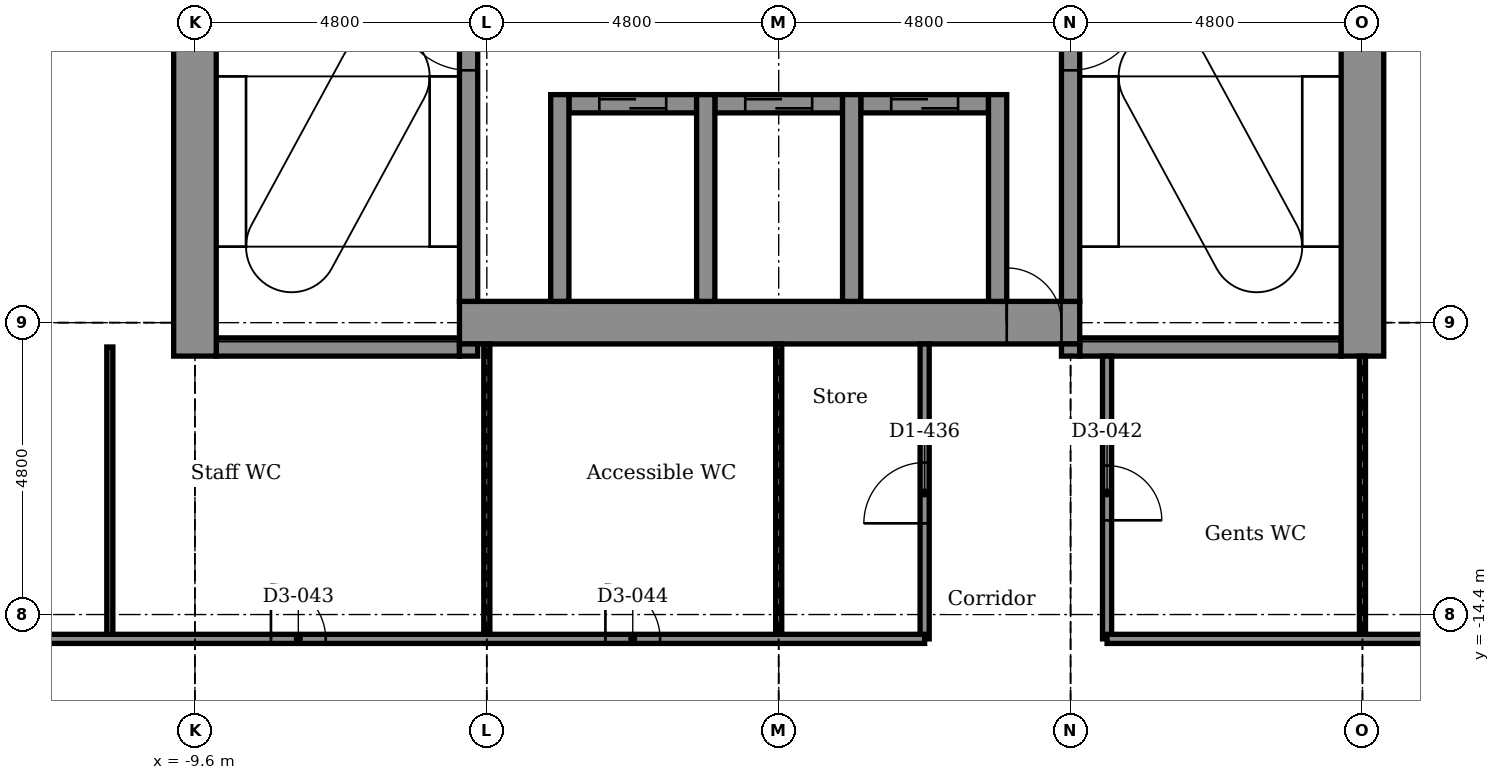
"""IFC4 building model, lengths in metres.
Left out: names, types, materials, properties, quantities, classifications, styles, units other than length and angle.
Written with IfcOpenShell. Run it as: python <this file> out.ifc"""

import sys

from ifc_helpers import new_model, si_unit, direction, frame, frame_2d, origin, place, context, subcontext, project, spatial, rectangle, extrude, element, fill, save


model = new_model("IFC4")
c1 = context("Model", 3, precision=1e-05, world=origin(), true_north=direction((0.0, 1.0)))
c2 = subcontext(c1, "Body", "Model", "MODEL_VIEW")
j1 = project(units=[si_unit("LENGTHUNIT", "METRE"), si_unit("PLANEANGLEUNIT", "RADIAN")], contexts=[c1])
p1 = place(None, origin())
s1 = spatial("IfcSite", under=j1, at=p1, CompositionType="ELEMENT")
p2 = place(p1, origin())
s2 = spatial("IfcBuilding", under=s1, at=p2, CompositionType="ELEMENT")
p3 = place(p2, frame((0.0, 0.0, 150.5)))
s3 = spatial("IfcBuildingStorey", under=s2, at=p3, CompositionType="ELEMENT", Elevation=150.5)
p4 = place(p3, frame((-9.25, -10.0, -0.15), z_axis=(0.0, 0.0, 1.0), x_axis=(1.0, 0.0, 0.0)))
e1 = element("IfcWall", 1, at=p4, inside=s3, PredefinedType="STANDARD", context=c2, shape_type="SweptSolid", body=[
    extrude(rectangle(XDim=4.0, YDim=0.3, at=frame_2d((2.0, 0.0))), origin(), (0.0, 0.0, 1.0), 3.9),
])
p5 = place(p3, frame((4.95, -10.0, -0.15), z_axis=(0.0, 0.0, 1.0), x_axis=(1.0, 0.0, 0.0)))
e2 = element("IfcWall", 2, at=p5, inside=s3, PredefinedType="STANDARD", context=c2, shape_type="SweptSolid", body=[
    extrude(rectangle(XDim=4.3, YDim=0.3, at=frame_2d((2.15, 0.0))), origin(), (0.0, 0.0, 1.0), 3.9),
])
p6 = place(p3, frame((-5.25, -9.6, -0.15), z_axis=(0.0, 0.0, 1.0), x_axis=(1.0, 0.0, 0.0)))
e3 = element("IfcWall", 3, at=p6, inside=s3, PredefinedType="SHEAR", context=c2, shape_type="SweptSolid", body=[
    extrude(rectangle(XDim=10.2, YDim=0.7, at=frame_2d((5.1, 0.0))), origin(), (0.0, 0.0, 1.0), 3.9),
])
p7 = place(p6, frame((9.0, 0.0, 0.15)))
e4 = element("IfcOpeningElement", 4, at=p7, cuts=e3, PredefinedType="OPENING", context=c2, shape_type="SweptSolid", body=[
    extrude(rectangle(XDim=0.9, YDim=2.1, at=frame_2d((0.45, 1.05))), frame((0.0, 0.36, 0.0), z_axis=(0.0, -1.0, 0.0), x_axis=(1.0, 0.0, 0.0)), (0.0, 0.0, 1.0), 0.72),
])
p8 = place(p3, frame((-3.45, -6.0, -0.15), z_axis=(0.0, 0.0, 1.0), x_axis=(1.0, 0.0, 0.0)))
e5 = element("IfcWall", 5, at=p8, inside=s3, PredefinedType="STANDARD", context=c2, shape_type="SweptSolid", body=[
    extrude(rectangle(XDim=2.1, YDim=0.3, at=frame_2d((1.05, 0.0))), origin(), (0.0, 0.0, 1.0), 3.9),
])
p9 = place(p8, frame((0.5, 0.0, 0.15)))
e6 = element("IfcOpeningElement", 6, at=p9, cuts=e5, PredefinedType="OPENING", context=c2, shape_type="SweptSolid", body=[
    extrude(rectangle(XDim=1.1, YDim=2.1, at=frame_2d((0.55, 1.05))), frame((0.0, 0.16, 0.0), z_axis=(0.0, -1.0, 0.0), x_axis=(1.0, 0.0, 0.0)), (0.0, 0.0, 1.0), 0.32),
])
p10 = place(p3, frame((-1.05, -6.0, -0.15), z_axis=(0.0, 0.0, 1.0), x_axis=(1.0, 0.0, 0.0)))
e7 = element("IfcWall", 7, at=p10, inside=s3, PredefinedType="STANDARD", context=c2, shape_type="SweptSolid", body=[
    extrude(rectangle(XDim=2.1, YDim=0.3, at=frame_2d((1.05, 0.0))), origin(), (0.0, 0.0, 1.0), 3.9),
])
p11 = place(p10, frame((0.5, 0.0, 0.15)))
e8 = element("IfcOpeningElement", 8, at=p11, cuts=e7, PredefinedType="OPENING", context=c2, shape_type="SweptSolid", body=[
    extrude(rectangle(XDim=1.1, YDim=2.1, at=frame_2d((0.55, 1.05))), frame((0.0, 0.16, 0.0), z_axis=(0.0, -1.0, 0.0), x_axis=(1.0, 0.0, 0.0)), (0.0, 0.0, 1.0), 0.32),
])
p12 = place(p3, frame((1.35, -6.0, -0.15), z_axis=(0.0, 0.0, 1.0), x_axis=(1.0, 0.0, 0.0)))
e9 = element("IfcWall", 9, at=p12, inside=s3, PredefinedType="STANDARD", context=c2, shape_type="SweptSolid", body=[
    extrude(rectangle(XDim=2.1, YDim=0.3, at=frame_2d((1.05, 0.0))), origin(), (0.0, 0.0, 1.0), 3.9),
])
p13 = place(p12, frame((0.5, 0.0, 0.15)))
e10 = element("IfcOpeningElement", 10, at=p13, cuts=e9, PredefinedType="OPENING", context=c2, shape_type="SweptSolid", body=[
    extrude(rectangle(XDim=1.1, YDim=2.1, at=frame_2d((0.55, 1.05))), frame((0.0, 0.16, 0.0), z_axis=(0.0, -1.0, 0.0), x_axis=(1.0, 0.0, 0.0)), (0.0, 0.0, 1.0), 0.32),
])
p14 = place(p3, frame((-9.6, -10.15, -0.15), z_axis=(0.0, 0.0, 1.0), x_axis=(0.0, 1.0, 0.0)))
e11 = element("IfcWall", 11, at=p14, inside=s3, PredefinedType="SHEAR", context=c2, shape_type="SweptSolid", body=[
    extrude(rectangle(XDim=7.6, YDim=0.7, at=frame_2d((3.8, 0.0))), origin(), (0.0, 0.0, 1.0), 3.9),
])
p15 = place(p3, frame((-5.1, -10.15, -0.15), z_axis=(0.0, 0.0, 1.0), x_axis=(0.0, 1.0, 0.0)))
e12 = element("IfcWall", 12, at=p15, inside=s3, PredefinedType="STANDARD", context=c2, shape_type="SweptSolid", body=[
    extrude(rectangle(XDim=0.2, YDim=0.3, at=frame_2d((0.1, 0.0))), origin(), (0.0, 0.0, 1.0), 3.9),
])
p16 = place(p3, frame((-5.1, -9.25, -0.15), z_axis=(0.0, 0.0, 1.0), x_axis=(0.0, 1.0, 0.0)))
e13 = element("IfcWall", 13, at=p16, inside=s3, PredefinedType="STANDARD", context=c2, shape_type="SweptSolid", body=[
    extrude(rectangle(XDim=7.0, YDim=0.3, at=frame_2d((3.5, 0.0))), origin(), (0.0, 0.0, 1.0), 3.9),
])
p17 = place(p16, frame((3.8, 0.0, 0.15)))
e14 = element("IfcOpeningElement", 14, at=p17, cuts=e13, PredefinedType="OPENING", context=c2, shape_type="SweptSolid", body=[
    extrude(rectangle(XDim=1.2, YDim=2.1, at=frame_2d((0.6, 1.05))), frame((0.0, 0.16, 0.0), z_axis=(0.0, -1.0, 0.0), x_axis=(1.0, 0.0, 0.0)), (0.0, 0.0, 1.0), 0.32),
])
for number, where, z_axis, x_axis in (
    (15, (-3.6, -9.25, -0.15), (0.0, 0.0, 1.0), (0.0, 1.0, 0.0)),
    (16, (-1.2, -9.25, -0.15), (0.0, 0.0, 1.0), (0.0, 1.0, 0.0)),
    (17, (1.2, -9.25, -0.15), (0.0, 0.0, 1.0), (0.0, 1.0, 0.0)),
    (18, (3.6, -9.25, -0.15), (0.0, 0.0, 1.0), (0.0, 1.0, 0.0)),
):
    element("IfcWall", number, at=place(p3, frame(where, z_axis=z_axis, x_axis=x_axis)), inside=s3, PredefinedType="STANDARD", context=c2, shape_type="SweptSolid", body=[
        extrude(rectangle(XDim=3.4, YDim=0.3, at=frame_2d((1.7, 0.0))), origin(), (0.0, 0.0, 1.0), 3.9),
    ])
p18 = place(p3, frame((4.8, -10.15, -0.15), z_axis=(0.0, 0.0, 1.0), x_axis=(0.0, 1.0, 0.0)))
e19 = element("IfcWall", 19, at=p18, inside=s3, PredefinedType="STANDARD", context=c2, shape_type="SweptSolid", body=[
    extrude(rectangle(XDim=0.2, YDim=0.3, at=frame_2d((0.1, 0.0))), origin(), (0.0, 0.0, 1.0), 3.9),
])
p19 = place(p3, frame((4.8, -9.25, -0.15), z_axis=(0.0, 0.0, 1.0), x_axis=(0.0, 1.0, 0.0)))
e20 = element("IfcWall", 20, at=p19, inside=s3, PredefinedType="STANDARD", context=c2, shape_type="SweptSolid", body=[
    extrude(rectangle(XDim=7.0, YDim=0.3, at=frame_2d((3.5, 0.0))), origin(), (0.0, 0.0, 1.0), 3.9),
])
p20 = place(p19, frame((3.8, 0.0, 0.15)))
e21 = element("IfcOpeningElement", 21, at=p20, cuts=e20, PredefinedType="OPENING", context=c2, shape_type="SweptSolid", body=[
    extrude(rectangle(XDim=1.2, YDim=2.1, at=frame_2d((0.6, 1.05))), frame((0.0, 0.16, 0.0), z_axis=(0.0, -1.0, 0.0), x_axis=(1.0, 0.0, 0.0)), (0.0, 0.0, 1.0), 0.32),
])
p21 = place(p3, frame((9.6, -10.15, -0.15), z_axis=(0.0, 0.0, 1.0), x_axis=(0.0, 1.0, 0.0)))
e22 = element("IfcWall", 22, at=p21, inside=s3, PredefinedType="SHEAR", context=c2, shape_type="SweptSolid", body=[
    extrude(rectangle(XDim=20.1, YDim=0.7, at=frame_2d((10.05, 0.0))), origin(), (0.0, 0.0, 1.0), 3.9),
])
p22 = place(p3, frame((9.6, -14.8, 0.0), z_axis=(0.0, 0.0, 1.0), x_axis=(0.0, 1.0, 0.0)))
e23 = element("IfcWall", 23, at=p22, inside=s3, PredefinedType="PARTITIONING", context=c2, shape_type="SweptSolid", body=[
    extrude(rectangle(XDim=4.65, YDim=0.1, at=frame_2d((2.325, 0.0))), origin(), (0.0, 0.0, 1.0), 3.066),
])
p23 = place(p3, frame((5.4, -14.8, 0.0), z_axis=(0.0, 0.0, 1.0), x_axis=(0.0, 1.0, 0.0)))
e24 = element("IfcWall", 24, at=p23, inside=s3, PredefinedType="PARTITIONING", context=c2, shape_type="SweptSolid", body=[
    extrude(rectangle(XDim=4.65, YDim=0.15, at=frame_2d((2.325, 0.0))), origin(), (0.0, 0.0, 1.0), 3.75),
])
p24 = place(p23, frame((1.95, 0.0, 0.0)))
e25 = element("IfcOpeningElement", 25, at=p24, cuts=e24, PredefinedType="OPENING", context=c2, shape_type="SweptSolid", body=[
    extrude(rectangle(XDim=0.9, YDim=2.1, at=frame_2d((0.45, 1.05))), frame((0.0, 0.085, 0.0), z_axis=(0.0, -1.0, 0.0), x_axis=(1.0, 0.0, 0.0)), (0.0, 0.0, 1.0), 0.17),
])
p25 = place(p3, frame((2.4, -14.8, 0.0), z_axis=(0.0, 0.0, 1.0), x_axis=(0.0, 1.0, 0.0)))
e26 = element("IfcWall", 26, at=p25, inside=s3, PredefinedType="PARTITIONING", context=c2, shape_type="SweptSolid", body=[
    extrude(rectangle(XDim=4.85, YDim=0.15, at=frame_2d((2.425, 0.0))), origin(), (0.0, 0.0, 1.0), 3.75),
])
p26 = place(p25, frame((1.9, 0.0, 0.0)))
e27 = element("IfcOpeningElement", 27, at=p26, cuts=e26, PredefinedType="OPENING", context=c2, shape_type="SweptSolid", body=[
    extrude(rectangle(XDim=1.0, YDim=2.1, at=frame_2d((0.5, 1.05))), frame((0.0, 0.085, 0.0), z_axis=(0.0, -1.0, 0.0), x_axis=(1.0, 0.0, 0.0)), (0.0, 0.0, 1.0), 0.17),
])
for number, where, z_axis, x_axis in (
    (28, (0.0, -14.8, 0.0), (0.0, 0.0, 1.0), (0.0, 1.0, 0.0)),
    (29, (-4.8, -14.8, 0.0), (0.0, 0.0, 1.0), (0.0, 1.0, 0.0)),
):
    element("IfcWall", number, at=place(p3, frame(where, z_axis=z_axis, x_axis=x_axis)), inside=s3, PredefinedType="PARTITIONING", context=c2, shape_type="SweptSolid", body=[
        extrude(rectangle(XDim=4.85, YDim=0.1, at=frame_2d((2.425, 0.0))), origin(), (0.0, 0.0, 1.0), 3.066),
    ])
p27 = place(p3, frame((-11.0, -14.8, 0.0), z_axis=(0.0, 0.0, 1.0), x_axis=(0.0, 1.0, 0.0)))
e30 = element("IfcWall", 30, at=p27, inside=s3, PredefinedType="PARTITIONING", context=c2, shape_type="SweptSolid", body=[
    extrude(rectangle(XDim=4.8, YDim=0.1, at=frame_2d((2.4, 0.0))), origin(), (0.0, 0.0, 1.0), 3.75),
])
p28 = place(p3, frame((-16.905, -14.8, 0.0), z_axis=(0.0, 0.0, 1.0), x_axis=(1.0, 0.0, 0.0)))
e31 = element("IfcWall", 31, at=p28, inside=s3, PredefinedType="PARTITIONING", context=c2, shape_type="SweptSolid", body=[
    extrude(rectangle(XDim=19.305, YDim=0.15, at=frame_2d((9.653, 0.0))), origin(), (0.0, 0.0, 1.0), 3.75),
])
p29 = place(p28, frame((8.555, 0.0, 0.0)))
e32 = element("IfcOpeningElement", 32, at=p29, cuts=e31, PredefinedType="OPENING", context=c2, shape_type="SweptSolid", body=[
    extrude(rectangle(XDim=0.9, YDim=2.1, at=frame_2d((0.45, 1.05))), frame((0.0, 0.085, 0.0), z_axis=(0.0, -1.0, 0.0), x_axis=(1.0, 0.0, 0.0)), (0.0, 0.0, 1.0), 0.17),
])
p30 = place(p28, frame((14.055, 0.0, 0.0)))
e33 = element("IfcOpeningElement", 33, at=p30, cuts=e31, PredefinedType="OPENING", context=c2, shape_type="SweptSolid", body=[
    extrude(rectangle(XDim=0.9, YDim=2.1, at=frame_2d((0.45, 1.05))), frame((0.0, 0.085, 0.0), z_axis=(0.0, -1.0, 0.0), x_axis=(1.0, 0.0, 0.0)), (0.0, 0.0, 1.0), 0.17),
])
p31 = place(p28, frame((1.079, 0.0, 0.0)))
e34 = element("IfcOpeningElement", 34, at=p31, cuts=e31, PredefinedType="OPENING", context=c2, shape_type="SweptSolid", body=[
    extrude(rectangle(XDim=1.8, YDim=2.1, at=frame_2d((0.9, 1.05))), frame((0.0, 0.085, 0.0), z_axis=(0.0, -1.0, 0.0), x_axis=(1.0, 0.0, 0.0)), (0.0, 0.0, 1.0), 0.17),
])
p32 = place(p3, frame((5.4, -14.8, 0.0), z_axis=(0.0, 0.0, 1.0), x_axis=(1.0, 0.0, 0.0)))
e35 = element("IfcWall", 35, at=p32, inside=s3, PredefinedType="PARTITIONING", context=c2, shape_type="SweptSolid", body=[
    extrude(rectangle(XDim=12.985, YDim=0.15, at=frame_2d((6.492, 0.0))), origin(), (0.0, 0.0, 1.0), 3.75),
])
p33 = place(p32, frame((9.731, 0.0, 0.0)))
e36 = element("IfcOpeningElement", 36, at=p33, cuts=e35, PredefinedType="OPENING", context=c2, shape_type="SweptSolid", body=[
    extrude(rectangle(XDim=1.8, YDim=2.1, at=frame_2d((0.9, 1.05))), frame((0.0, 0.085, 0.0), z_axis=(0.0, -1.0, 0.0), x_axis=(1.0, 0.0, 0.0)), (0.0, 0.0, 1.0), 0.17),
])
p34 = place(p24, frame((0.9, 0.0, 0.0), z_axis=(0.0, 0.0, 1.0), x_axis=(-1.0, 0.0, 0.0)))
e37 = element("IfcDoor", 37, at=p34, inside=s3, OperationType="SINGLE_SWING_LEFT", PredefinedType="DOOR", context=c2, shape_type="SweptSolid", body=[
    extrude(rectangle(XDim=0.9, YDim=2.1, at=frame_2d((0.45, 1.05))), frame((0.0, 0.025, 0.0), z_axis=(0.0, -1.0, 0.0), x_axis=(1.0, 0.0, 0.0)), (0.0, 0.0, 1.0), 0.05),
])
fill(e25, e37)
p35 = place(p29, origin())
e38 = element("IfcDoor", 38, at=p35, inside=s3, OperationType="SINGLE_SWING_LEFT", PredefinedType="DOOR", context=c2, shape_type="SweptSolid", body=[
    extrude(rectangle(XDim=0.9, YDim=2.1, at=frame_2d((0.45, 1.05))), frame((0.0, 0.025, 0.0), z_axis=(0.0, -1.0, 0.0), x_axis=(1.0, 0.0, 0.0)), (0.0, 0.0, 1.0), 0.05),
])
fill(e32, e38)
p36 = place(p30, origin())
e39 = element("IfcDoor", 39, at=p36, inside=s3, OperationType="SINGLE_SWING_LEFT", PredefinedType="DOOR", context=c2, shape_type="SweptSolid", body=[
    extrude(rectangle(XDim=0.9, YDim=2.1, at=frame_2d((0.45, 1.05))), frame((0.0, 0.025, 0.0), z_axis=(0.0, -1.0, 0.0), x_axis=(1.0, 0.0, 0.0)), (0.0, 0.0, 1.0), 0.05),
])
fill(e33, e39)
p37 = place(p26, origin())
e40 = element("IfcDoor", 40, at=p37, inside=s3, OperationType="SINGLE_SWING_LEFT", PredefinedType="DOOR", context=c2, shape_type="SweptSolid", body=[
    extrude(rectangle(XDim=1.0, YDim=2.1, at=frame_2d((0.5, 1.05))), frame((0.0, 0.025, 0.0), z_axis=(0.0, -1.0, 0.0), x_axis=(1.0, 0.0, 0.0)), (0.0, 0.0, 1.0), 0.05),
])
fill(e27, e40)
p38 = place(p9, origin())
e41 = element("IfcDoor", 41, at=p38, inside=s3, OperationType="DOUBLE_DOOR_SLIDING", PredefinedType="DOOR", context=c2, shape_type="SweptSolid", body=[
    extrude(rectangle(XDim=1.1, YDim=2.1, at=frame_2d((0.55, 1.05))), frame((0.0, 0.025, 0.0), z_axis=(0.0, -1.0, 0.0), x_axis=(1.0, 0.0, 0.0)), (0.0, 0.0, 1.0), 0.05),
])
fill(e6, e41)
p39 = place(p11, origin())
e42 = element("IfcDoor", 42, at=p39, inside=s3, OperationType="DOUBLE_DOOR_SLIDING", PredefinedType="DOOR", context=c2, shape_type="SweptSolid", body=[
    extrude(rectangle(XDim=1.1, YDim=2.1, at=frame_2d((0.55, 1.05))), frame((0.0, 0.025, 0.0), z_axis=(0.0, -1.0, 0.0), x_axis=(1.0, 0.0, 0.0)), (0.0, 0.0, 1.0), 0.05),
])
fill(e8, e42)
p40 = place(p13, origin())
e43 = element("IfcDoor", 43, at=p40, inside=s3, OperationType="DOUBLE_DOOR_SLIDING", PredefinedType="DOOR", context=c2, shape_type="SweptSolid", body=[
    extrude(rectangle(XDim=1.1, YDim=2.1, at=frame_2d((0.55, 1.05))), frame((0.0, 0.025, 0.0), z_axis=(0.0, -1.0, 0.0), x_axis=(1.0, 0.0, 0.0)), (0.0, 0.0, 1.0), 0.05),
])
fill(e10, e43)
p41 = place(p17, origin())
e44 = element("IfcDoor", 44, at=p41, inside=s3, OperationType="SINGLE_SWING_RIGHT", PredefinedType="DOOR", context=c2, shape_type="SweptSolid", body=[
    extrude(rectangle(XDim=1.2, YDim=2.1, at=frame_2d((0.6, 1.05))), frame((0.0, 0.025, 0.0), z_axis=(0.0, -1.0, 0.0), x_axis=(1.0, 0.0, 0.0)), (0.0, 0.0, 1.0), 0.05),
])
fill(e14, e44)
p42 = place(p20, frame((1.2, 0.0, 0.0), z_axis=(0.0, 0.0, 1.0), x_axis=(-1.0, 0.0, 0.0)))
e45 = element("IfcDoor", 45, at=p42, inside=s3, OperationType="SINGLE_SWING_RIGHT", PredefinedType="DOOR", context=c2, shape_type="SweptSolid", body=[
    extrude(rectangle(XDim=1.2, YDim=2.1, at=frame_2d((0.6, 1.05))), frame((0.0, 0.025, 0.0), z_axis=(0.0, -1.0, 0.0), x_axis=(1.0, 0.0, 0.0)), (0.0, 0.0, 1.0), 0.05),
])
fill(e21, e45)
p43 = place(p7, origin())
e46 = element("IfcDoor", 46, at=p43, inside=s3, OperationType="SINGLE_SWING_LEFT", PredefinedType="DOOR", context=c2, shape_type="SweptSolid", body=[
    extrude(rectangle(XDim=0.9, YDim=2.1, at=frame_2d((0.45, 1.05))), frame((0.0, 0.025, 0.0), z_axis=(0.0, -1.0, 0.0), x_axis=(1.0, 0.0, 0.0)), (0.0, 0.0, 1.0), 0.05),
])
fill(e4, e46)
save(model, sys.argv[1])
